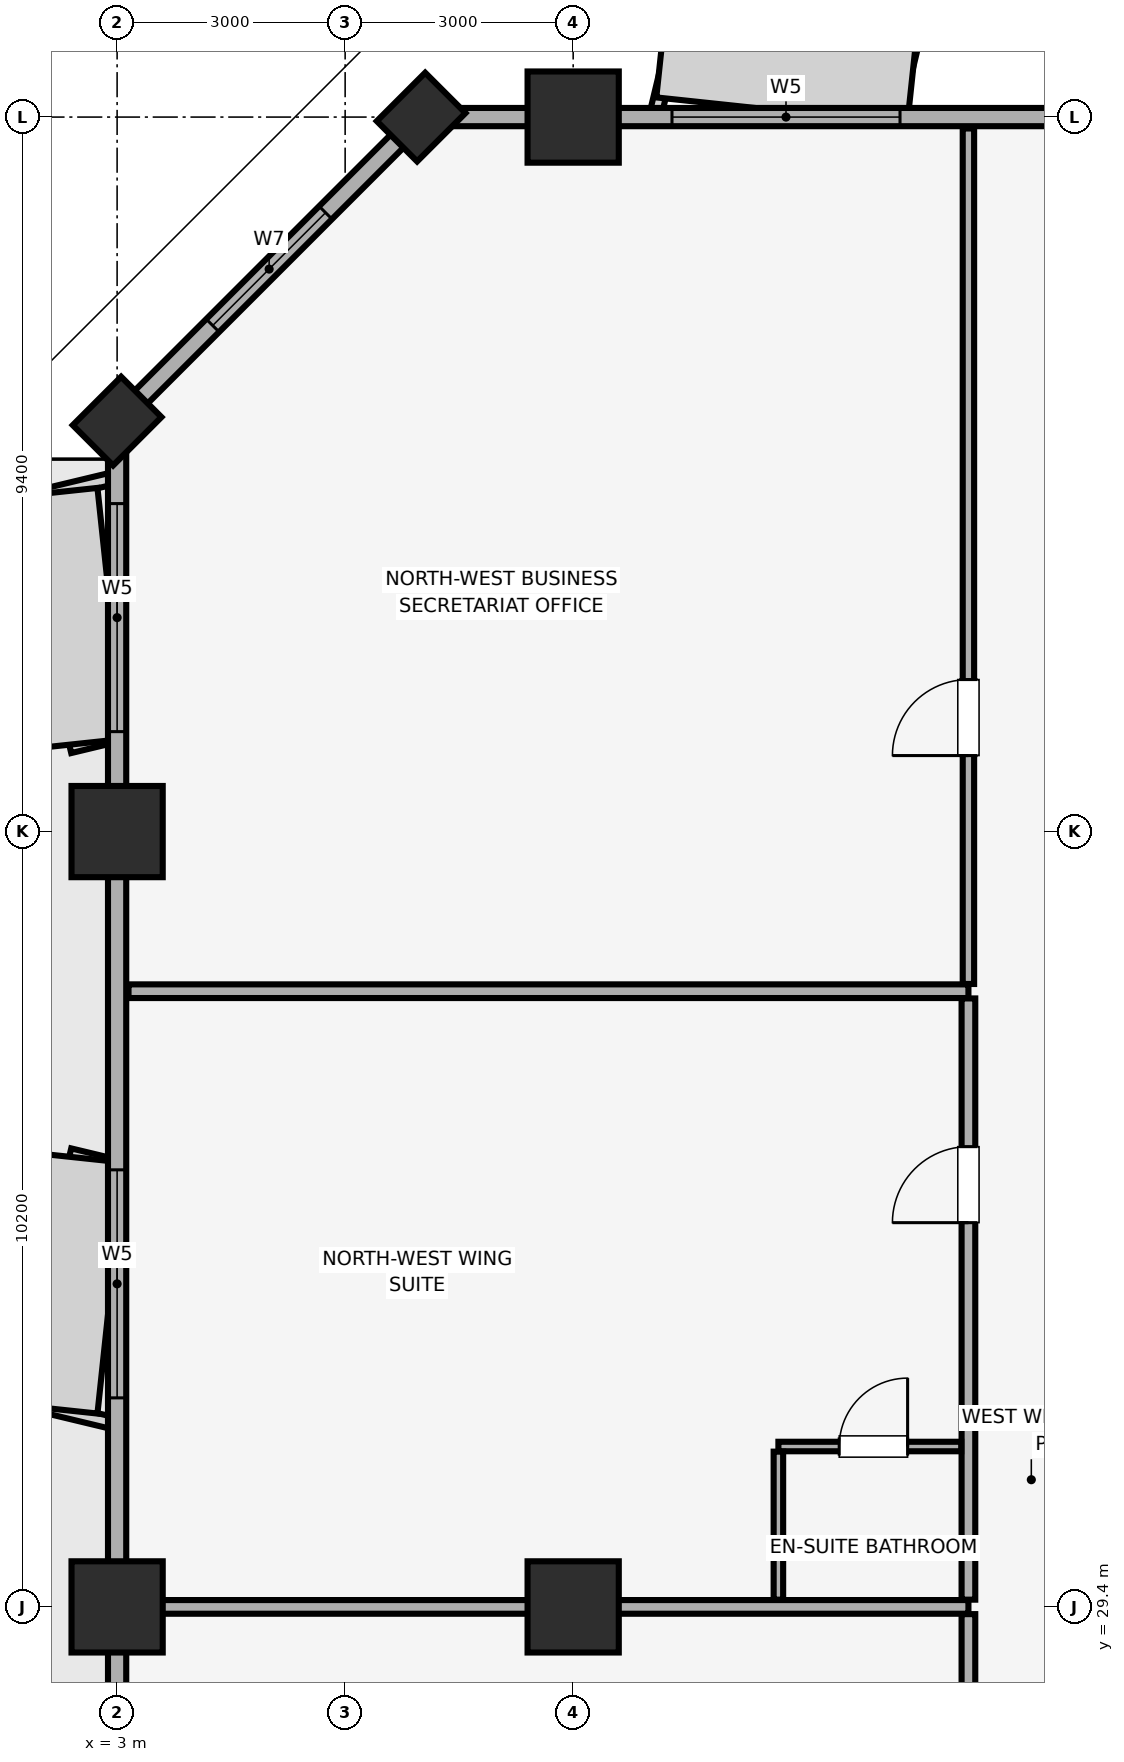
"""IFC4 building model, lengths in metres.
Left out: names, types, materials, properties, quantities, classifications, styles, units other than length and angle.
Written with IfcOpenShell. Run it as: python <this file> out.ifc"""

import sys

from ifc_helpers import new_model, si_unit, direction, frame, frame_2d, origin, origin_2d, place, context, subcontext, project, spatial, rectangle, extrude, element, fill, save


model = new_model("IFC4")
c1 = context("Model", 3, precision=1e-05, world=origin(), true_north=direction((0.0, 1.0)))
c2 = subcontext(c1, "Body", "Model", "MODEL_VIEW")
j1 = project(units=[si_unit("LENGTHUNIT", "METRE"), si_unit("PLANEANGLEUNIT", "RADIAN")], contexts=[c1])
p1 = place(None, origin())
s1 = spatial("IfcSite", under=j1, at=p1, CompositionType="ELEMENT")
p2 = place(p1, origin())
s2 = spatial("IfcBuilding", under=s1, at=p2, CompositionType="ELEMENT")
p3 = place(p2, frame((0.0, 0.0, 135.35)))
s3 = spatial("IfcBuildingStorey", under=s2, at=p3, CompositionType="ELEMENT", Elevation=135.35)
for number, where, z_axis, x_axis in (
    (1, (3.0, 29.4, 0.0), (0.0, 0.0, 1.0), (1.0, 0.0, 0.0)),
    (2, (3.0, 39.6, 0.0), (0.0, 0.0, 1.0), (1.0, 0.0, 0.0)),
):
    element("IfcColumn", number, at=place(p3, frame(where, z_axis=z_axis, x_axis=x_axis)), inside=s3, PredefinedType="COLUMN", context=c2, shape_type="SweptSolid", body=[
        extrude(rectangle(XDim=1.2, YDim=1.2, at=origin_2d()), origin(), (0.0, 0.0, 1.0), 3.56),
    ])
for number, where, z_axis, x_axis in (
    (3, (7.0, 49.0, 0.0), (0.0, 0.0, 1.0), (0.707, 0.707, 0.0)),
    (4, (3.0, 45.0, 0.0), (0.0, 0.0, 1.0), (0.707, 0.707, 0.0)),
):
    element("IfcColumn", number, at=place(p3, frame(where, z_axis=z_axis, x_axis=x_axis)), inside=s3, PredefinedType="PILASTER", context=c2, shape_type="SweptSolid", body=[
        extrude(rectangle(XDim=0.9, YDim=0.75, at=origin_2d()), origin(), (0.0, 0.0, 1.0), 3.56),
    ])
for number, where, z_axis, x_axis in (
    (5, (9.0, 29.4, 0.0), (0.0, 0.0, 1.0), (1.0, 0.0, 0.0)),
    (6, (9.0, 49.0, 0.0), (0.0, 0.0, 1.0), (1.0, 0.0, 0.0)),
):
    element("IfcColumn", number, at=place(p3, frame(where, z_axis=z_axis, x_axis=x_axis)), inside=s3, PredefinedType="COLUMN", context=c2, shape_type="SweptSolid", body=[
        extrude(rectangle(XDim=1.2, YDim=1.2, at=origin_2d()), origin(), (0.0, 0.0, 1.0), 3.56),
    ])
p4 = place(p3, frame((77.0, 49.0, 0.0), z_axis=(0.0, 0.0, 1.0), x_axis=(-1.0, 0.0, 0.0)))
e7 = element("IfcWall", 7, at=p4, inside=s3, PredefinedType="SOLIDWALL", context=c2, shape_type="SweptSolid", body=[
    extrude(rectangle(XDim=70.0, YDim=0.24, at=frame_2d((35.0, 0.0))), origin(), (0.0, 0.0, 1.0), 2.61),
])
p5 = place(p4, frame((63.7, 0.0, 0.85)))
e8 = element("IfcOpeningElement", 8, at=p5, cuts=e7, PredefinedType="OPENING", context=c2, shape_type="SweptSolid", body=[
    extrude(rectangle(XDim=3.0, YDim=1.5, at=frame_2d((1.5, 0.75))), frame((0.0, 0.13, 0.0), z_axis=(0.0, -1.0, 0.0), x_axis=(1.0, 0.0, 0.0)), (0.0, 0.0, 1.0), 0.26),
])
p6 = place(p4, frame((3.3, 0.0, 0.85)))
e9 = element("IfcOpeningElement", 9, at=p6, cuts=e7, PredefinedType="OPENING", context=c2, shape_type="SweptSolid", body=[
    extrude(rectangle(XDim=3.0, YDim=1.5, at=frame_2d((1.5, 0.75))), frame((0.0, 0.13, 0.0), z_axis=(0.0, -1.0, 0.0), x_axis=(1.0, 0.0, 0.0)), (0.0, 0.0, 1.0), 0.26),
])
p7 = place(p4, frame((48.565, 0.0, 0.9)))
e10 = element("IfcOpeningElement", 10, at=p7, cuts=e7, PredefinedType="OPENING", context=c2, shape_type="SweptSolid", body=[
    extrude(rectangle(XDim=1.5, YDim=1.4, at=frame_2d((0.75, 0.7))), frame((0.0, 0.13, 0.0), z_axis=(0.0, -1.0, 0.0), x_axis=(1.0, 0.0, 0.0)), (0.0, 0.0, 1.0), 0.26),
])
p8 = place(p4, frame((41.75, 0.0, 0.9)))
e11 = element("IfcOpeningElement", 11, at=p8, cuts=e7, PredefinedType="OPENING", context=c2, shape_type="SweptSolid", body=[
    extrude(rectangle(XDim=1.5, YDim=1.4, at=frame_2d((0.75, 0.7))), frame((0.0, 0.13, 0.0), z_axis=(0.0, -1.0, 0.0), x_axis=(1.0, 0.0, 0.0)), (0.0, 0.0, 1.0), 0.26),
])
p9 = place(p4, frame((25.3, 0.0, 0.9)))
e12 = element("IfcOpeningElement", 12, at=p9, cuts=e7, PredefinedType="OPENING", context=c2, shape_type="SweptSolid", body=[
    extrude(rectangle(XDim=1.5, YDim=1.4, at=frame_2d((0.75, 0.7))), frame((0.0, 0.13, 0.0), z_axis=(0.0, -1.0, 0.0), x_axis=(1.0, 0.0, 0.0)), (0.0, 0.0, 1.0), 0.26),
])
p10 = place(p4, frame((20.685, 0.0, 0.9)))
e13 = element("IfcOpeningElement", 13, at=p10, cuts=e7, PredefinedType="OPENING", context=c2, shape_type="SweptSolid", body=[
    extrude(rectangle(XDim=1.5, YDim=1.4, at=frame_2d((0.75, 0.7))), frame((0.0, 0.13, 0.0), z_axis=(0.0, -1.0, 0.0), x_axis=(1.0, 0.0, 0.0)), (0.0, 0.0, 1.0), 0.26),
])
p11 = place(p3, frame((7.0, 49.0, 0.0), z_axis=(0.0, 0.0, 1.0), x_axis=(-0.707106781187, -0.707106781187, 0.0)))
e14 = element("IfcWall", 14, at=p11, inside=s3, PredefinedType="SOLIDWALL", context=c2, shape_type="SweptSolid", body=[
    extrude(rectangle(XDim=5.657, YDim=0.24, at=frame_2d((2.828, 0.0))), origin(), (0.0, 0.0, 1.0), 2.61),
])
p12 = place(p11, frame((1.778, 0.0, 0.85)))
e15 = element("IfcOpeningElement", 15, at=p12, cuts=e14, PredefinedType="OPENING", context=c2, shape_type="SweptSolid", body=[
    extrude(rectangle(XDim=2.1, YDim=1.6, at=frame_2d((1.05, 0.8))), frame((0.0, 0.13, 0.0), z_axis=(0.0, -1.0, 0.0), x_axis=(1.0, 0.0, 0.0)), (0.0, 0.0, 1.0), 0.26),
])
p13 = place(p3, frame((3.0, 45.0, 0.0), z_axis=(0.0, 0.0, 1.0), x_axis=(0.0, -1.0, 0.0)))
e16 = element("IfcWall", 16, at=p13, inside=s3, PredefinedType="SOLIDWALL", context=c2, shape_type="SweptSolid", body=[
    extrude(rectangle(XDim=38.0, YDim=0.24, at=frame_2d((19.0, 0.0))), origin(), (0.0, 0.0, 1.0), 2.61),
])
p14 = place(p13, frame((22.1, 0.0, 0.0)))
e17 = element("IfcOpeningElement", 17, at=p14, cuts=e16, PredefinedType="OPENING", context=c2, shape_type="SweptSolid", body=[
    extrude(rectangle(XDim=1.4, YDim=2.2, at=frame_2d((0.7, 1.1))), frame((0.0, 0.13, 0.0), z_axis=(0.0, -1.0, 0.0), x_axis=(1.0, 0.0, 0.0)), (0.0, 0.0, 1.0), 0.26),
])
p15 = place(p13, frame((33.95, 0.0, 0.85)))
e18 = element("IfcOpeningElement", 18, at=p15, cuts=e16, PredefinedType="OPENING", context=c2, shape_type="SweptSolid", body=[
    extrude(rectangle(XDim=3.0, YDim=1.5, at=frame_2d((1.5, 0.75))), frame((0.0, 0.13, 0.0), z_axis=(0.0, -1.0, 0.0), x_axis=(1.0, 0.0, 0.0)), (0.0, 0.0, 1.0), 0.26),
])
p16 = place(p13, frame((31.1, 0.0, 0.85)))
e19 = element("IfcOpeningElement", 19, at=p16, cuts=e16, PredefinedType="OPENING", context=c2, shape_type="SweptSolid", body=[
    extrude(rectangle(XDim=1.5, YDim=1.4, at=frame_2d((0.75, 0.7))), frame((0.0, 0.13, 0.0), z_axis=(0.0, -1.0, 0.0), x_axis=(1.0, 0.0, 0.0)), (0.0, 0.0, 1.0), 0.26),
])
p17 = place(p13, frame((25.16, 0.0, 0.85)))
e20 = element("IfcOpeningElement", 20, at=p17, cuts=e16, PredefinedType="OPENING", context=c2, shape_type="SweptSolid", body=[
    extrude(rectangle(XDim=3.0, YDim=1.5, at=frame_2d((1.5, 0.75))), frame((0.0, 0.13, 0.0), z_axis=(0.0, -1.0, 0.0), x_axis=(1.0, 0.0, 0.0)), (0.0, 0.0, 1.0), 0.26),
])
p18 = place(p13, frame((17.44, 0.0, 0.85)))
e21 = element("IfcOpeningElement", 21, at=p18, cuts=e16, PredefinedType="OPENING", context=c2, shape_type="SweptSolid", body=[
    extrude(rectangle(XDim=3.0, YDim=1.5, at=frame_2d((1.5, 0.75))), frame((0.0, 0.13, 0.0), z_axis=(0.0, -1.0, 0.0), x_axis=(1.0, 0.0, 0.0)), (0.0, 0.0, 1.0), 0.26),
])
p19 = place(p13, frame((9.85, 0.0, 0.85)))
e22 = element("IfcOpeningElement", 22, at=p19, cuts=e16, PredefinedType="OPENING", context=c2, shape_type="SweptSolid", body=[
    extrude(rectangle(XDim=3.0, YDim=1.5, at=frame_2d((1.5, 0.75))), frame((0.0, 0.13, 0.0), z_axis=(0.0, -1.0, 0.0), x_axis=(1.0, 0.0, 0.0)), (0.0, 0.0, 1.0), 0.26),
])
p20 = place(p13, frame((1.085, 0.0, 0.85)))
e23 = element("IfcOpeningElement", 23, at=p20, cuts=e16, PredefinedType="OPENING", context=c2, shape_type="SweptSolid", body=[
    extrude(rectangle(XDim=3.0, YDim=1.5, at=frame_2d((1.5, 0.75))), frame((0.0, 0.13, 0.0), z_axis=(0.0, -1.0, 0.0), x_axis=(1.0, 0.0, 0.0)), (0.0, 0.0, 1.0), 0.26),
])
p21 = place(p3, frame((3.15, 29.4, 0.0), z_axis=(0.0, 0.0, 1.0), x_axis=(1.0, 0.0, 0.0)))
e24 = element("IfcWall", 24, at=p21, inside=s3, PredefinedType="PARTITIONING", context=c2, shape_type="SweptSolid", body=[
    extrude(rectangle(XDim=11.05, YDim=0.18, at=frame_2d((5.525, 0.0))), origin(), (0.0, 0.0, 1.0), 2.91),
])
p22 = place(p3, frame((14.2, 11.795, 0.0), z_axis=(0.0, 0.0, 1.0), x_axis=(0.0, 1.0, 0.0)))
e25 = element("IfcWall", 25, at=p22, inside=s3, PredefinedType="PARTITIONING", context=c2, shape_type="SweptSolid", body=[
    extrude(rectangle(XDim=17.51, YDim=0.18, at=frame_2d((8.755, 0.0))), origin(), (0.0, 0.0, 1.0), 3.56),
])
p23 = place(p22, frame((9.905, 0.0, 0.0)))
e26 = element("IfcOpeningElement", 26, at=p23, cuts=e25, PredefinedType="OPENING", context=c2, shape_type="SweptSolid", body=[
    extrude(rectangle(XDim=1.0, YDim=2.15, at=frame_2d((0.5, 1.075))), frame((0.0, 0.1, 0.0), z_axis=(0.0, -1.0, 0.0), x_axis=(1.0, 0.0, 0.0)), (0.0, 0.0, 1.0), 0.2),
])
p24 = place(p3, frame((3.15, 37.5, 0.0), z_axis=(0.0, 0.0, 1.0), x_axis=(1.0, 0.0, 0.0)))
e27 = element("IfcWall", 27, at=p24, inside=s3, PredefinedType="PARTITIONING", context=c2, shape_type="SweptSolid", body=[
    extrude(rectangle(XDim=11.05, YDim=0.18, at=frame_2d((5.525, 0.0))), origin(), (0.0, 0.0, 1.0), 3.56),
])
p25 = place(p3, frame((14.2, 29.495, 0.0), z_axis=(0.0, 0.0, 1.0), x_axis=(0.0, 1.0, 0.0)))
e28 = element("IfcWall", 28, at=p25, inside=s3, PredefinedType="PARTITIONING", context=c2, shape_type="SweptSolid", body=[
    extrude(rectangle(XDim=7.91, YDim=0.18, at=frame_2d((3.955, 0.0))), origin(), (0.0, 0.0, 1.0), 3.56),
])
p26 = place(p25, frame((4.96, 0.0, 0.0)))
e29 = element("IfcOpeningElement", 29, at=p26, cuts=e28, PredefinedType="OPENING", context=c2, shape_type="SweptSolid", body=[
    extrude(rectangle(XDim=1.0, YDim=2.15, at=frame_2d((0.5, 1.075))), frame((0.0, 0.1, 0.0), z_axis=(0.0, -1.0, 0.0), x_axis=(1.0, 0.0, 0.0)), (0.0, 0.0, 1.0), 0.2),
])
p27 = place(p3, frame((11.7, 31.51, 0.0), z_axis=(0.0, 0.0, 1.0), x_axis=(1.0, 0.0, 0.0)))
e30 = element("IfcWall", 30, at=p27, inside=s3, PredefinedType="PARTITIONING", context=c2, shape_type="SweptSolid", body=[
    extrude(rectangle(XDim=2.405, YDim=0.125, at=frame_2d((1.203, 0.0))), origin(), (0.0, 0.0, 1.0), 3.56),
])
p28 = place(p27, frame((0.8, 0.0, 0.0)))
e31 = element("IfcOpeningElement", 31, at=p28, cuts=e30, PredefinedType="OPENING", context=c2, shape_type="SweptSolid", body=[
    extrude(rectangle(XDim=0.9, YDim=2.1, at=frame_2d((0.45, 1.05))), frame((0.0, 0.073, 0.0), z_axis=(0.0, -1.0, 0.0), x_axis=(1.0, 0.0, 0.0)), (0.0, 0.0, 1.0), 0.145),
])
p29 = place(p3, frame((11.7, 29.495, 0.0), z_axis=(0.0, 0.0, 1.0), x_axis=(0.0, 1.0, 0.0)))
e32 = element("IfcWall", 32, at=p29, inside=s3, PredefinedType="PARTITIONING", context=c2, shape_type="SweptSolid", body=[
    extrude(rectangle(XDim=1.947, YDim=0.125, at=frame_2d((0.974, 0.0))), origin(), (0.0, 0.0, 1.0), 3.56),
])
p30 = place(p3, frame((14.2, 37.595, 0.0), z_axis=(0.0, 0.0, 1.0), x_axis=(0.0, 1.0, 0.0)))
e33 = element("IfcWall", 33, at=p30, inside=s3, PredefinedType="PARTITIONING", context=c2, shape_type="SweptSolid", body=[
    extrude(rectangle(XDim=11.255, YDim=0.15, at=frame_2d((5.627, 0.0))), origin(), (0.0, 0.0, 1.0), 3.56),
])
p31 = place(p30, frame((3.005, 0.0, 0.0)))
e34 = element("IfcOpeningElement", 34, at=p31, cuts=e33, PredefinedType="OPENING", context=c2, shape_type="SweptSolid", body=[
    extrude(rectangle(XDim=1.0, YDim=2.15, at=frame_2d((0.5, 1.075))), frame((0.0, 0.085, 0.0), z_axis=(0.0, -1.0, 0.0), x_axis=(1.0, 0.0, 0.0)), (0.0, 0.0, 1.0), 0.17),
])
p32 = place(p12, origin())
e35 = element("IfcWindow", 35, at=p32, inside=s3, PartitioningType="SINGLE_PANEL", PredefinedType="WINDOW", context=c2, shape_type="SweptSolid", body=[
    extrude(rectangle(XDim=2.1, YDim=1.6, at=frame_2d((1.05, 0.8))), frame((0.0, 0.03, 0.0), z_axis=(0.0, -1.0, 0.0), x_axis=(1.0, 0.0, 0.0)), (0.0, 0.0, 1.0), 0.06),
])
fill(e15, e35)
p33 = place(p19, origin())
e36 = element("IfcWindow", 36, at=p33, inside=s3, PartitioningType="SINGLE_PANEL", PredefinedType="WINDOW", context=c2, shape_type="SweptSolid", body=[
    extrude(rectangle(XDim=3.0, YDim=1.5, at=frame_2d((1.5, 0.75))), frame((0.0, 0.03, 0.0), z_axis=(0.0, -1.0, 0.0), x_axis=(1.0, 0.0, 0.0)), (0.0, 0.0, 1.0), 0.06),
])
fill(e22, e36)
p34 = place(p20, origin())
e37 = element("IfcWindow", 37, at=p34, inside=s3, PartitioningType="SINGLE_PANEL", PredefinedType="WINDOW", context=c2, shape_type="SweptSolid", body=[
    extrude(rectangle(XDim=3.0, YDim=1.5, at=frame_2d((1.5, 0.75))), frame((0.0, 0.03, 0.0), z_axis=(0.0, -1.0, 0.0), x_axis=(1.0, 0.0, 0.0)), (0.0, 0.0, 1.0), 0.06),
])
fill(e23, e37)
p35 = place(p5, origin())
e38 = element("IfcWindow", 38, at=p35, inside=s3, PartitioningType="SINGLE_PANEL", PredefinedType="WINDOW", context=c2, shape_type="SweptSolid", body=[
    extrude(rectangle(XDim=3.0, YDim=1.5, at=frame_2d((1.5, 0.75))), frame((0.0, 0.03, 0.0), z_axis=(0.0, -1.0, 0.0), x_axis=(1.0, 0.0, 0.0)), (0.0, 0.0, 1.0), 0.06),
])
fill(e8, e38)
p36 = place(p26, origin())
e39 = element("IfcDoor", 39, at=p36, inside=s3, OperationType="SINGLE_SWING_LEFT", PredefinedType="DOOR", context=c2, shape_type="SweptSolid", body=[
    extrude(rectangle(XDim=1.0, YDim=2.15, at=frame_2d((0.5, 1.075))), frame((0.0, 0.025, 0.0), z_axis=(0.0, -1.0, 0.0), x_axis=(1.0, 0.0, 0.0)), (0.0, 0.0, 1.0), 0.05),
])
fill(e29, e39)
p37 = place(p28, origin())
e40 = element("IfcDoor", 40, at=p37, inside=s3, OperationType="SINGLE_SWING_RIGHT", PredefinedType="DOOR", context=c2, shape_type="SweptSolid", body=[
    extrude(rectangle(XDim=0.9, YDim=2.1, at=frame_2d((0.45, 1.05))), frame((0.0, 0.025, 0.0), z_axis=(0.0, -1.0, 0.0), x_axis=(1.0, 0.0, 0.0)), (0.0, 0.0, 1.0), 0.05),
])
fill(e31, e40)
p38 = place(p31, origin())
e41 = element("IfcDoor", 41, at=p38, inside=s3, OperationType="SINGLE_SWING_LEFT", PredefinedType="DOOR", context=c2, shape_type="SweptSolid", body=[
    extrude(rectangle(XDim=1.0, YDim=2.15, at=frame_2d((0.5, 1.075))), frame((0.0, 0.025, 0.0), z_axis=(0.0, -1.0, 0.0), x_axis=(1.0, 0.0, 0.0)), (0.0, 0.0, 1.0), 0.05),
])
fill(e34, e41)
save(model, sys.argv[1])
